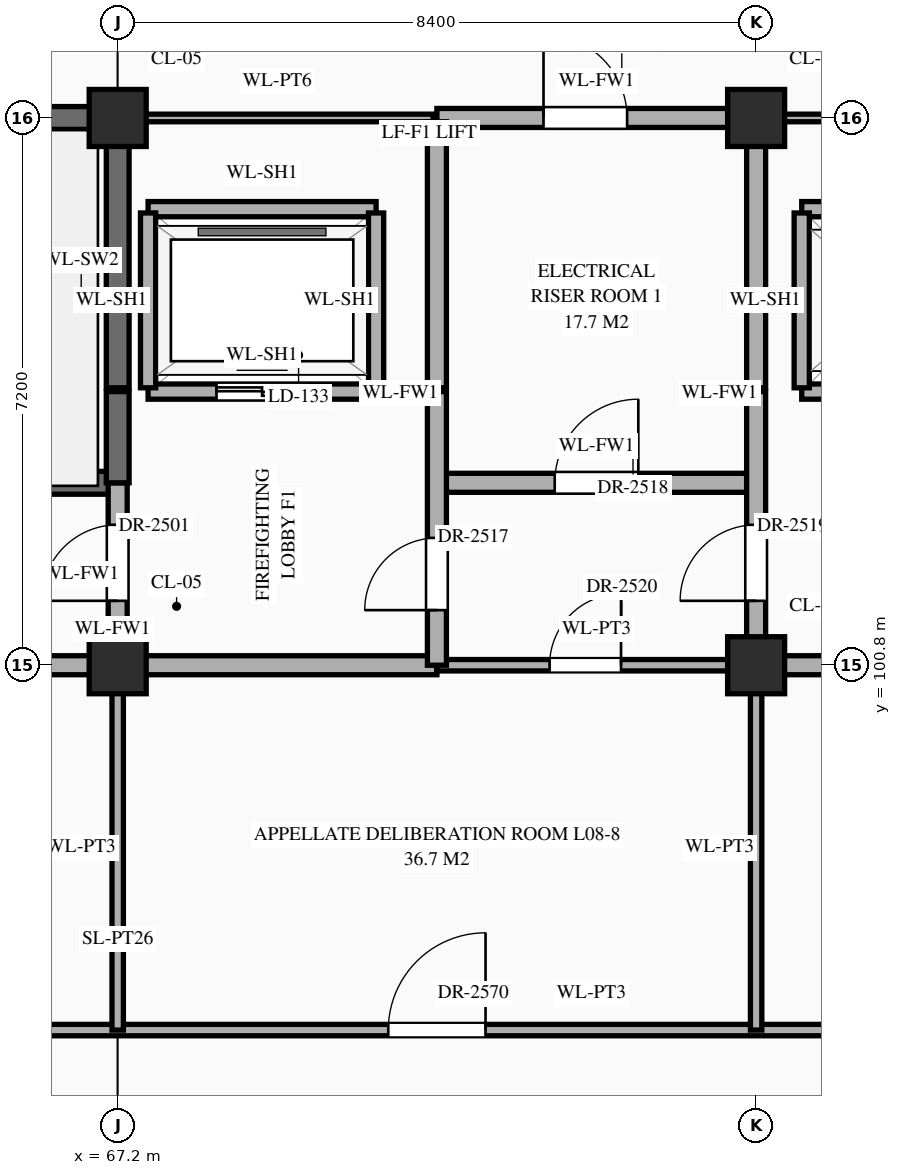
"""IFC4 building model, lengths in metres.
Left out: names, types, materials, properties, quantities, classifications, styles, units other than length and angle.
Written with IfcOpenShell. Run it as: python <this file> out.ifc"""

import sys

from ifc_helpers import new_model, si_unit, direction, frame, frame_2d, origin, origin_2d, place, context, subcontext, project, spatial, rectangle, extrude, element, fill, save


model = new_model("IFC4")
c1 = context("Model", 3, precision=1e-05, world=origin(), true_north=direction((0.0, 1.0)))
c2 = subcontext(c1, "Body", "Model", "MODEL_VIEW")
j1 = project(units=[si_unit("LENGTHUNIT", "METRE"), si_unit("PLANEANGLEUNIT", "RADIAN")], contexts=[c1])
p1 = place(None, origin())
s1 = spatial("IfcSite", under=j1, at=p1, CompositionType="ELEMENT")
p2 = place(p1, origin())
s2 = spatial("IfcBuilding", under=s1, at=p2, CompositionType="ELEMENT")
p3 = place(p2, frame((0.0, 0.0, 35.1)))
s3 = spatial("IfcBuildingStorey", under=s2, at=p3, CompositionType="ELEMENT", Elevation=35.1)
for number, where, z_axis, x_axis in (
    (1, (67.2, 100.8, 0.0), (0.0, 0.0, 1.0), (1.0, 0.0, 0.0)),
    (2, (67.2, 108.0, 0.0), (0.0, 0.0, 1.0), (1.0, 0.0, 0.0)),
    (3, (75.6, 100.8, 0.0), (0.0, 0.0, 1.0), (1.0, 0.0, 0.0)),
    (4, (75.6, 108.0, 0.0), (0.0, 0.0, 1.0), (1.0, 0.0, 0.0)),
):
    element("IfcColumn", number, at=place(p3, frame(where, z_axis=z_axis, x_axis=x_axis)), inside=s3, PredefinedType="COLUMN", context=c2, shape_type="SweptSolid", body=[
        extrude(rectangle(XDim=0.75, YDim=0.75, at=origin_2d()), origin(), (0.0, 0.0, 1.0), 4.2),
    ])
p4 = place(p3, frame((56.2, 96.0, 0.0), z_axis=(0.0, 0.0, 1.0), x_axis=(1.0, 0.0, 0.0)))
e5 = element("IfcWall", 5, at=p4, inside=s3, PredefinedType="STANDARD", context=c2, shape_type="SweptSolid", body=[
    extrude(rectangle(XDim=27.8, YDim=0.15, at=frame_2d((13.9, 0.0))), origin(), (0.0, 0.0, 1.0), 3.95),
])
p5 = place(p4, frame((0.7, 0.0, 0.0)))
e6 = element("IfcOpeningElement", 6, at=p5, cuts=e5, PredefinedType="OPENING", context=c2, shape_type="SweptSolid", body=[
    extrude(rectangle(XDim=1.2, YDim=2.35, at=frame_2d((0.6, 1.175))), frame((0.0, 0.087, 0.0), z_axis=(0.0, -1.0, 0.0), x_axis=(1.0, 0.0, 0.0)), (0.0, 0.0, 1.0), 0.174),
])
p6 = place(p4, frame((6.18, 0.0, 0.0)))
e7 = element("IfcOpeningElement", 7, at=p6, cuts=e5, PredefinedType="OPENING", context=c2, shape_type="SweptSolid", body=[
    extrude(rectangle(XDim=1.24, YDim=2.3, at=frame_2d((0.62, 1.15))), frame((0.0, 0.087, 0.0), z_axis=(0.0, -1.0, 0.0), x_axis=(1.0, 0.0, 0.0)), (0.0, 0.0, 1.0), 0.174),
])
p7 = place(p4, frame((14.56, 0.0, 0.0)))
e8 = element("IfcOpeningElement", 8, at=p7, cuts=e5, PredefinedType="OPENING", context=c2, shape_type="SweptSolid", body=[
    extrude(rectangle(XDim=1.28, YDim=2.35, at=frame_2d((0.64, 1.175))), frame((0.0, 0.087, 0.0), z_axis=(0.0, -1.0, 0.0), x_axis=(1.0, 0.0, 0.0)), (0.0, 0.0, 1.0), 0.174),
])
p8 = place(p4, frame((23.13, 0.0, 0.0)))
e9 = element("IfcOpeningElement", 9, at=p8, cuts=e5, PredefinedType="OPENING", context=c2, shape_type="SweptSolid", body=[
    extrude(rectangle(XDim=0.94, YDim=2.3, at=frame_2d((0.47, 1.15))), frame((0.0, 0.087, 0.0), z_axis=(0.0, -1.0, 0.0), x_axis=(1.0, 0.0, 0.0)), (0.0, 0.0, 1.0), 0.174),
])
p9 = place(p3, frame((58.8, 100.8, 0.0), z_axis=(0.0, 0.0, 1.0), x_axis=(1.0, 0.0, 0.0)))
e10 = element("IfcWall", 10, at=p9, inside=s3, PredefinedType="STANDARD", context=c2, shape_type="SweptSolid", body=[
    extrude(rectangle(XDim=12.6, YDim=0.25, at=frame_2d((6.3, 0.0))), origin(), (0.0, 0.0, 1.0), 3.1),
])
p10 = place(p9, frame((3.65, 0.0, 0.0)))
e11 = element("IfcOpeningElement", 11, at=p10, cuts=e10, PredefinedType="OPENING", context=c2, shape_type="SweptSolid", body=[
    extrude(rectangle(XDim=1.1, YDim=2.2, at=frame_2d((0.55, 1.1))), frame((0.0, 0.137, 0.0), z_axis=(0.0, -1.0, 0.0), x_axis=(1.0, 0.0, 0.0)), (0.0, 0.0, 1.0), 0.274),
])
p11 = place(p3, frame((71.4, 100.8, 0.0), z_axis=(0.0, 0.0, 1.0), x_axis=(1.0, 0.0, 0.0)))
e12 = element("IfcWall", 12, at=p11, inside=s3, PredefinedType="STANDARD", context=c2, shape_type="SweptSolid", body=[
    extrude(rectangle(XDim=4.2, YDim=0.15, at=frame_2d((2.1, 0.0))), origin(), (0.0, 0.0, 1.0), 3.1),
])
p12 = place(p11, frame((1.482, 0.0, 0.0)))
e13 = element("IfcOpeningElement", 13, at=p12, cuts=e12, PredefinedType="OPENING", context=c2, shape_type="SweptSolid", body=[
    extrude(rectangle(XDim=0.94, YDim=2.3, at=frame_2d((0.47, 1.15))), frame((0.0, 0.087, 0.0), z_axis=(0.0, -1.0, 0.0), x_axis=(1.0, 0.0, 0.0)), (0.0, 0.0, 1.0), 0.174),
])
p13 = place(p3, frame((75.6, 100.8, 0.0), z_axis=(0.0, 0.0, 1.0), x_axis=(1.0, 0.0, 0.0)))
e14 = element("IfcWall", 14, at=p13, inside=s3, PredefinedType="STANDARD", context=c2, shape_type="SweptSolid", body=[
    extrude(rectangle(XDim=16.8, YDim=0.25, at=frame_2d((8.4, 0.0))), origin(), (0.0, 0.0, 1.0), 3.1),
])
p14 = place(p13, frame((3.65, 0.0, 0.0)))
e15 = element("IfcOpeningElement", 15, at=p14, cuts=e14, PredefinedType="OPENING", context=c2, shape_type="SweptSolid", body=[
    extrude(rectangle(XDim=1.1, YDim=2.2, at=frame_2d((0.55, 1.1))), frame((0.0, 0.137, 0.0), z_axis=(0.0, -1.0, 0.0), x_axis=(1.0, 0.0, 0.0)), (0.0, 0.0, 1.0), 0.274),
])
p15 = place(p13, frame((9.772, 0.0, 0.0)))
e16 = element("IfcOpeningElement", 16, at=p15, cuts=e14, PredefinedType="OPENING", context=c2, shape_type="SweptSolid", body=[
    extrude(rectangle(XDim=0.95, YDim=2.15, at=frame_2d((0.475, 1.075))), frame((0.0, 0.137, 0.0), z_axis=(0.0, -1.0, 0.0), x_axis=(1.0, 0.0, 0.0)), (0.0, 0.0, 1.0), 0.274),
])
p16 = place(p13, frame((12.45, 0.0, 0.0)))
e17 = element("IfcOpeningElement", 17, at=p16, cuts=e14, PredefinedType="OPENING", context=c2, shape_type="SweptSolid", body=[
    extrude(rectangle(XDim=1.1, YDim=2.2, at=frame_2d((0.55, 1.1))), frame((0.0, 0.137, 0.0), z_axis=(0.0, -1.0, 0.0), x_axis=(1.0, 0.0, 0.0)), (0.0, 0.0, 1.0), 0.274),
])
p17 = place(p13, frame((14.853, 0.0, 0.0)))
e18 = element("IfcOpeningElement", 18, at=p17, cuts=e14, PredefinedType="OPENING", context=c2, shape_type="SweptSolid", body=[
    extrude(rectangle(XDim=1.0, YDim=2.2, at=frame_2d((0.5, 1.1))), frame((0.0, 0.137, 0.0), z_axis=(0.0, -1.0, 0.0), x_axis=(1.0, 0.0, 0.0)), (0.0, 0.0, 1.0), 0.274),
])
p18 = place(p3, frame((58.8, 103.2, 0.0), z_axis=(0.0, 0.0, 1.0), x_axis=(1.0, 0.0, 0.0)))
e19 = element("IfcWall", 19, at=p18, inside=s3, PredefinedType="SHEAR", context=c2, shape_type="SweptSolid", body=[
    extrude(rectangle(XDim=8.4, YDim=0.3, at=frame_2d((4.2, 0.0))), origin(), (0.0, 0.0, 1.0), 3.95),
])
p19 = place(p18, frame((0.65, 0.0, 0.0)))
e20 = element("IfcOpeningElement", 20, at=p19, cuts=e19, PredefinedType="OPENING", context=c2, shape_type="SweptSolid", body=[
    extrude(rectangle(XDim=1.1, YDim=2.2, at=frame_2d((0.55, 1.1))), frame((0.0, 0.162, 0.0), z_axis=(0.0, -1.0, 0.0), x_axis=(1.0, 0.0, 0.0)), (0.0, 0.0, 1.0), 0.324),
])
p20 = place(p3, frame((71.4, 103.2, 0.0), z_axis=(0.0, 0.0, 1.0), x_axis=(1.0, 0.0, 0.0)))
e21 = element("IfcWall", 21, at=p20, inside=s3, PredefinedType="STANDARD", context=c2, shape_type="SweptSolid", body=[
    extrude(rectangle(XDim=4.2, YDim=0.25, at=frame_2d((2.1, 0.0))), origin(), (0.0, 0.0, 1.0), 3.95),
])
p21 = place(p20, frame((1.55, 0.0, 0.0)))
e22 = element("IfcOpeningElement", 22, at=p21, cuts=e21, PredefinedType="OPENING", context=c2, shape_type="SweptSolid", body=[
    extrude(rectangle(XDim=1.1, YDim=2.2, at=frame_2d((0.55, 1.1))), frame((0.0, 0.137, 0.0), z_axis=(0.0, -1.0, 0.0), x_axis=(1.0, 0.0, 0.0)), (0.0, 0.0, 1.0), 0.274),
])
p22 = place(p3, frame((67.6, 104.4, 0.0), z_axis=(0.0, 0.0, 1.0), x_axis=(1.0, 0.0, 0.0)))
e23 = element("IfcWall", 23, at=p22, inside=s3, PredefinedType="STANDARD", context=c2, shape_type="SweptSolid", body=[
    extrude(rectangle(XDim=3.0, YDim=0.2, at=frame_2d((1.5, 0.0))), origin(), (0.0, 0.0, 1.0), 3.95),
])
p23 = place(p22, frame((0.9, 0.0, 0.0)))
e24 = element("IfcOpeningElement", 24, at=p23, cuts=e23, PredefinedType="OPENING", context=c2, shape_type="SweptSolid", body=[
    extrude(rectangle(XDim=1.2, YDim=2.15, at=frame_2d((0.6, 1.075))), frame((0.0, 0.112, 0.0), z_axis=(0.0, -1.0, 0.0), x_axis=(1.0, 0.0, 0.0)), (0.0, 0.0, 1.0), 0.224),
])
p24 = place(p3, frame((76.2, 104.4, 0.0), z_axis=(0.0, 0.0, 1.0), x_axis=(1.0, 0.0, 0.0)))
e25 = element("IfcWall", 25, at=p24, inside=s3, PredefinedType="STANDARD", context=c2, shape_type="SweptSolid", body=[
    extrude(rectangle(XDim=2.4, YDim=0.2, at=frame_2d((1.2, 0.0))), origin(), (0.0, 0.0, 1.0), 3.95),
])
p25 = place(p24, frame((0.7, 0.0, 0.0)))
e26 = element("IfcOpeningElement", 26, at=p25, cuts=e25, PredefinedType="OPENING", context=c2, shape_type="SweptSolid", body=[
    extrude(rectangle(XDim=1.0, YDim=2.15, at=frame_2d((0.5, 1.075))), frame((0.0, 0.112, 0.0), z_axis=(0.0, -1.0, 0.0), x_axis=(1.0, 0.0, 0.0)), (0.0, 0.0, 1.0), 0.224),
])
p26 = place(p3, frame((67.6, 106.8, 0.0), z_axis=(0.0, 0.0, 1.0), x_axis=(1.0, 0.0, 0.0)))
e27 = element("IfcWall", 27, at=p26, inside=s3, PredefinedType="STANDARD", context=c2, shape_type="SweptSolid", body=[
    extrude(rectangle(XDim=3.0, YDim=0.2, at=frame_2d((1.5, 0.0))), origin(), (0.0, 0.0, 1.0), 3.95),
])
p27 = place(p3, frame((76.2, 106.8, 0.0), z_axis=(0.0, 0.0, 1.0), x_axis=(1.0, 0.0, 0.0)))
e28 = element("IfcWall", 28, at=p27, inside=s3, PredefinedType="STANDARD", context=c2, shape_type="SweptSolid", body=[
    extrude(rectangle(XDim=2.4, YDim=0.2, at=frame_2d((1.2, 0.0))), origin(), (0.0, 0.0, 1.0), 3.95),
])
p28 = place(p3, frame((58.8, 108.0, 0.0), z_axis=(0.0, 0.0, 1.0), x_axis=(1.0, 0.0, 0.0)))
e29 = element("IfcWall", 29, at=p28, inside=s3, PredefinedType="SHEAR", context=c2, shape_type="SweptSolid", body=[
    extrude(rectangle(XDim=8.4, YDim=0.3, at=frame_2d((4.2, 0.0))), origin(), (0.0, 0.0, 1.0), 3.95),
])
p29 = place(p3, frame((67.25, 108.0, 0.0), z_axis=(0.0, 0.0, 1.0), x_axis=(1.0, 0.0, 0.0)))
e30 = element("IfcWall", 30, at=p29, inside=s3, PredefinedType="STANDARD", context=c2, shape_type="SweptSolid", body=[
    extrude(rectangle(XDim=4.1, YDim=0.1, at=frame_2d((2.05, 0.0))), origin(), (0.0, 0.0, 1.0), 3.1),
])
p30 = place(p3, frame((71.4, 108.0, 0.0), z_axis=(0.0, 0.0, 1.0), x_axis=(1.0, 0.0, 0.0)))
e31 = element("IfcWall", 31, at=p30, inside=s3, PredefinedType="STANDARD", context=c2, shape_type="SweptSolid", body=[
    extrude(rectangle(XDim=4.2, YDim=0.25, at=frame_2d((2.1, 0.0))), origin(), (0.0, 0.0, 1.0), 3.1),
])
p31 = place(p30, frame((1.403, 0.0, 0.0)))
e32 = element("IfcOpeningElement", 32, at=p31, cuts=e31, PredefinedType="OPENING", context=c2, shape_type="SweptSolid", body=[
    extrude(rectangle(XDim=1.1, YDim=2.2, at=frame_2d((0.55, 1.1))), frame((0.0, 0.137, 0.0), z_axis=(0.0, -1.0, 0.0), x_axis=(1.0, 0.0, 0.0)), (0.0, 0.0, 1.0), 0.274),
])
p32 = place(p3, frame((75.65, 108.0, 0.0), z_axis=(0.0, 0.0, 1.0), x_axis=(1.0, 0.0, 0.0)))
e33 = element("IfcWall", 33, at=p32, inside=s3, PredefinedType="STANDARD", context=c2, shape_type="SweptSolid", body=[
    extrude(rectangle(XDim=6.15, YDim=0.1, at=frame_2d((3.075, 0.0))), origin(), (0.0, 0.0, 1.0), 3.1),
])
p33 = place(p3, frame((67.2, 96.0, 0.0), z_axis=(0.0, 0.0, 1.0), x_axis=(0.0, 1.0, 0.0)))
e34 = element("IfcWall", 34, at=p33, inside=s3, PredefinedType="STANDARD", context=c2, shape_type="SweptSolid", body=[
    extrude(rectangle(XDim=4.8, YDim=0.15, at=frame_2d((2.4, 0.0))), origin(), (0.0, 0.0, 1.0), 3.2),
])
p34 = place(p3, frame((67.2, 100.8, 0.0), z_axis=(0.0, 0.0, 1.0), x_axis=(0.0, 1.0, 0.0)))
e35 = element("IfcWall", 35, at=p34, inside=s3, PredefinedType="STANDARD", context=c2, shape_type="SweptSolid", body=[
    extrude(rectangle(XDim=2.4, YDim=0.25, at=frame_2d((1.2, 0.0))), origin(), (0.0, 0.0, 1.0), 3.2),
])
p35 = place(p34, frame((0.847, 0.0, 0.0)))
e36 = element("IfcOpeningElement", 36, at=p35, cuts=e35, PredefinedType="OPENING", context=c2, shape_type="SweptSolid", body=[
    extrude(rectangle(XDim=1.0, YDim=2.2, at=frame_2d((0.5, 1.1))), frame((0.0, 0.137, 0.0), z_axis=(0.0, -1.0, 0.0), x_axis=(1.0, 0.0, 0.0)), (0.0, 0.0, 1.0), 0.274),
])
p36 = place(p3, frame((67.2, 103.2, 0.0), z_axis=(0.0, 0.0, 1.0), x_axis=(0.0, 1.0, 0.0)))
e37 = element("IfcWall", 37, at=p36, inside=s3, PredefinedType="SHEAR", context=c2, shape_type="SweptSolid", body=[
    extrude(rectangle(XDim=1.2, YDim=0.3, at=frame_2d((0.6, 0.0))), origin(), (0.0, 0.0, 1.0), 3.95),
])
p37 = place(p3, frame((67.2, 104.45, 0.0), z_axis=(0.0, 0.0, 1.0), x_axis=(0.0, 1.0, 0.0)))
e38 = element("IfcWall", 38, at=p37, inside=s3, PredefinedType="SHEAR", context=c2, shape_type="SweptSolid", body=[
    extrude(rectangle(XDim=3.5, YDim=0.3, at=frame_2d((1.75, 0.0))), origin(), (0.0, 0.0, 1.0), 3.95),
])
for number, where, z_axis, x_axis in (
    (39, (67.6, 104.45, 0.0), (0.0, 0.0, 1.0), (0.0, 1.0, 0.0)),
    (40, (70.6, 104.45, 0.0), (0.0, 0.0, 1.0), (0.0, 1.0, 0.0)),
):
    element("IfcWall", number, at=place(p3, frame(where, z_axis=z_axis, x_axis=x_axis)), inside=s3, PredefinedType="STANDARD", context=c2, shape_type="SweptSolid", body=[
        extrude(rectangle(XDim=2.3, YDim=0.2, at=frame_2d((1.15, 0.0))), origin(), (0.0, 0.0, 1.0), 3.95),
    ])
p38 = place(p3, frame((71.4, 100.8, 0.0), z_axis=(0.0, 0.0, 1.0), x_axis=(0.0, 1.0, 0.0)))
e41 = element("IfcWall", 41, at=p38, inside=s3, PredefinedType="STANDARD", context=c2, shape_type="SweptSolid", body=[
    extrude(rectangle(XDim=3.6, YDim=0.25, at=frame_2d((1.8, 0.0))), origin(), (0.0, 0.0, 1.0), 3.6),
])
p39 = place(p38, frame((0.725, 0.0, 0.0)))
e42 = element("IfcOpeningElement", 42, at=p39, cuts=e41, PredefinedType="OPENING", context=c2, shape_type="SweptSolid", body=[
    extrude(rectangle(XDim=0.95, YDim=2.15, at=frame_2d((0.475, 1.075))), frame((0.0, 0.137, 0.0), z_axis=(0.0, -1.0, 0.0), x_axis=(1.0, 0.0, 0.0)), (0.0, 0.0, 1.0), 0.274),
])
p40 = place(p3, frame((71.4, 104.45, 0.0), z_axis=(0.0, 0.0, 1.0), x_axis=(0.0, 1.0, 0.0)))
e43 = element("IfcWall", 43, at=p40, inside=s3, PredefinedType="STANDARD", context=c2, shape_type="SweptSolid", body=[
    extrude(rectangle(XDim=3.5, YDim=0.25, at=frame_2d((1.75, 0.0))), origin(), (0.0, 0.0, 1.0), 3.6),
])
p41 = place(p3, frame((75.6, 96.0, 0.0), z_axis=(0.0, 0.0, 1.0), x_axis=(0.0, 1.0, 0.0)))
e44 = element("IfcWall", 44, at=p41, inside=s3, PredefinedType="STANDARD", context=c2, shape_type="SweptSolid", body=[
    extrude(rectangle(XDim=4.8, YDim=0.15, at=frame_2d((2.4, 0.0))), origin(), (0.0, 0.0, 1.0), 3.2),
])
p42 = place(p3, frame((75.6, 100.8, 0.0), z_axis=(0.0, 0.0, 1.0), x_axis=(0.0, 1.0, 0.0)))
e45 = element("IfcWall", 45, at=p42, inside=s3, PredefinedType="STANDARD", context=c2, shape_type="SweptSolid", body=[
    extrude(rectangle(XDim=3.6, YDim=0.25, at=frame_2d((1.8, 0.0))), origin(), (0.0, 0.0, 1.0), 3.2),
])
p43 = place(p42, frame((0.847, 0.0, 0.0)))
e46 = element("IfcOpeningElement", 46, at=p43, cuts=e45, PredefinedType="OPENING", context=c2, shape_type="SweptSolid", body=[
    extrude(rectangle(XDim=1.0, YDim=2.2, at=frame_2d((0.5, 1.1))), frame((0.0, 0.137, 0.0), z_axis=(0.0, -1.0, 0.0), x_axis=(1.0, 0.0, 0.0)), (0.0, 0.0, 1.0), 0.274),
])
p44 = place(p3, frame((75.6, 104.45, 0.0), z_axis=(0.0, 0.0, 1.0), x_axis=(0.0, 1.0, 0.0)))
e47 = element("IfcWall", 47, at=p44, inside=s3, PredefinedType="STANDARD", context=c2, shape_type="SweptSolid", body=[
    extrude(rectangle(XDim=3.5, YDim=0.25, at=frame_2d((1.75, 0.0))), origin(), (0.0, 0.0, 1.0), 3.2),
])
p45 = place(p3, frame((76.2, 104.45, 0.0), z_axis=(0.0, 0.0, 1.0), x_axis=(0.0, 1.0, 0.0)))
e48 = element("IfcWall", 48, at=p45, inside=s3, PredefinedType="STANDARD", context=c2, shape_type="SweptSolid", body=[
    extrude(rectangle(XDim=2.3, YDim=0.2, at=frame_2d((1.15, 0.0))), origin(), (0.0, 0.0, 1.0), 3.95),
])
p46 = place(p23, origin())
e49 = element("IfcDoor", 49, at=p46, inside=s3, OperationType="DOUBLE_DOOR_SLIDING", PredefinedType="DOOR", context=c2, shape_type="SweptSolid", body=[
    extrude(rectangle(XDim=1.2, YDim=2.15, at=frame_2d((0.6, 1.075))), frame((0.0, 0.025, 0.0), z_axis=(0.0, -1.0, 0.0), x_axis=(1.0, 0.0, 0.0)), (0.0, 0.0, 1.0), 0.05),
])
fill(e24, e49)
p47 = place(p35, origin())
e50 = element("IfcDoor", 50, at=p47, inside=s3, OperationType="SINGLE_SWING_LEFT", PredefinedType="DOOR", context=c2, shape_type="SweptSolid", body=[
    extrude(rectangle(XDim=1.0, YDim=2.2, at=frame_2d((0.5, 1.1))), frame((0.0, 0.025, 0.0), z_axis=(0.0, -1.0, 0.0), x_axis=(1.0, 0.0, 0.0)), (0.0, 0.0, 1.0), 0.05),
])
fill(e36, e50)
p48 = place(p39, origin())
e51 = element("IfcDoor", 51, at=p48, inside=s3, OperationType="SINGLE_SWING_LEFT", PredefinedType="DOOR", context=c2, shape_type="SweptSolid", body=[
    extrude(rectangle(XDim=0.95, YDim=2.15, at=frame_2d((0.475, 1.075))), frame((0.0, 0.025, 0.0), z_axis=(0.0, -1.0, 0.0), x_axis=(1.0, 0.0, 0.0)), (0.0, 0.0, 1.0), 0.05),
])
fill(e42, e51)
p49 = place(p21, origin())
e52 = element("IfcDoor", 52, at=p49, inside=s3, OperationType="SINGLE_SWING_RIGHT", PredefinedType="DOOR", context=c2, shape_type="SweptSolid", body=[
    extrude(rectangle(XDim=1.1, YDim=2.2, at=frame_2d((0.55, 1.1))), frame((0.0, 0.025, 0.0), z_axis=(0.0, -1.0, 0.0), x_axis=(1.0, 0.0, 0.0)), (0.0, 0.0, 1.0), 0.05),
])
fill(e22, e52)
p50 = place(p43, origin())
e53 = element("IfcDoor", 53, at=p50, inside=s3, OperationType="SINGLE_SWING_LEFT", PredefinedType="DOOR", context=c2, shape_type="SweptSolid", body=[
    extrude(rectangle(XDim=1.0, YDim=2.2, at=frame_2d((0.5, 1.1))), frame((0.0, 0.025, 0.0), z_axis=(0.0, -1.0, 0.0), x_axis=(1.0, 0.0, 0.0)), (0.0, 0.0, 1.0), 0.05),
])
fill(e46, e53)
p51 = place(p12, origin())
e54 = element("IfcDoor", 54, at=p51, inside=s3, OperationType="SINGLE_SWING_RIGHT", PredefinedType="DOOR", context=c2, shape_type="SweptSolid", body=[
    extrude(rectangle(XDim=0.94, YDim=2.3, at=frame_2d((0.47, 1.15))), frame((0.0, 0.025, 0.0), z_axis=(0.0, -1.0, 0.0), x_axis=(1.0, 0.0, 0.0)), (0.0, 0.0, 1.0), 0.05),
])
fill(e13, e54)
p52 = place(p31, origin())
e55 = element("IfcDoor", 55, at=p52, inside=s3, OperationType="SINGLE_SWING_LEFT", PredefinedType="DOOR", context=c2, shape_type="SweptSolid", body=[
    extrude(rectangle(XDim=1.1, YDim=2.2, at=frame_2d((0.55, 1.1))), frame((0.0, 0.025, 0.0), z_axis=(0.0, -1.0, 0.0), x_axis=(1.0, 0.0, 0.0)), (0.0, 0.0, 1.0), 0.05),
])
fill(e32, e55)
p53 = place(p7, origin())
e56 = element("IfcDoor", 56, at=p53, inside=s3, OperationType="SINGLE_SWING_RIGHT", PredefinedType="DOOR", context=c2, shape_type="SweptSolid", body=[
    extrude(rectangle(XDim=1.28, YDim=2.35, at=frame_2d((0.64, 1.175))), frame((0.0, 0.025, 0.0), z_axis=(0.0, -1.0, 0.0), x_axis=(1.0, 0.0, 0.0)), (0.0, 0.0, 1.0), 0.05),
])
fill(e8, e56)
save(model, sys.argv[1])
